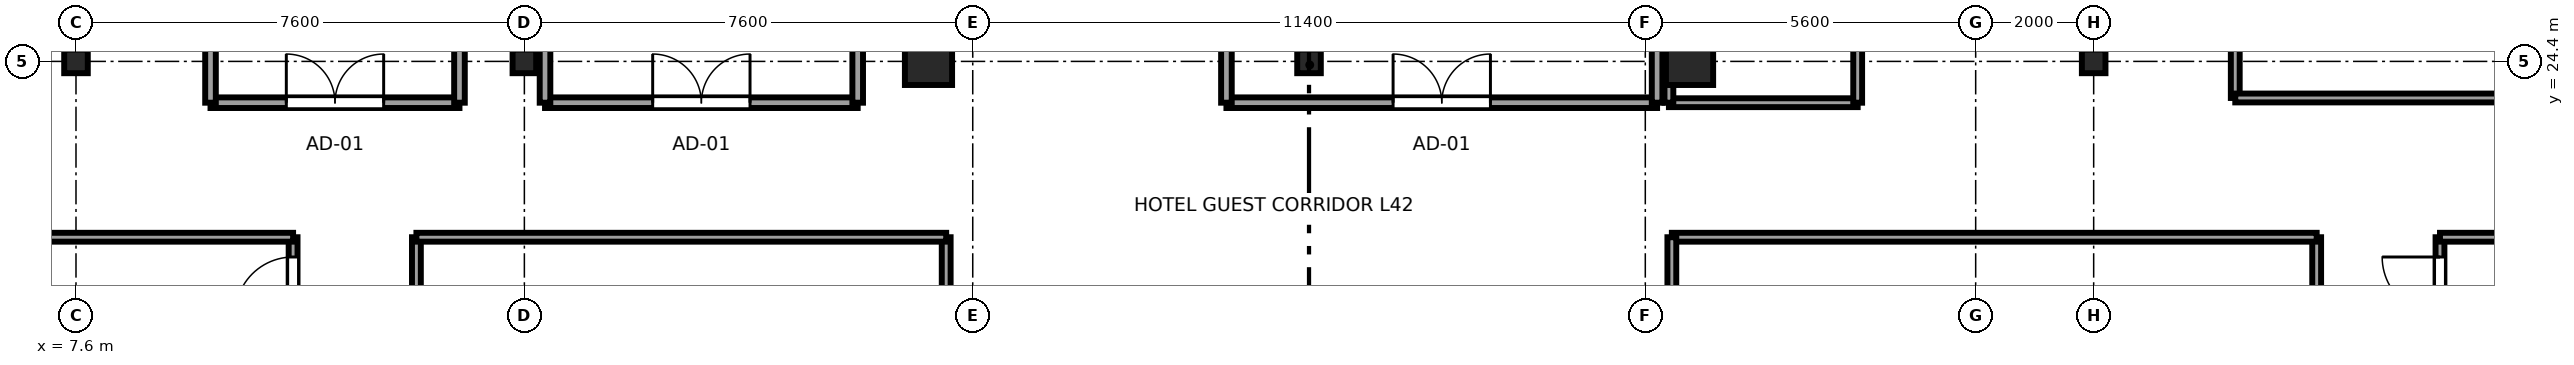
"""IFC4 building model, lengths in metres.
Left out: names, types, materials, properties, quantities, classifications, styles, units other than length and angle.
Written with IfcOpenShell. Run it as: python <this file> out.ifc"""

import sys

from ifc_helpers import new_model, si_unit, direction, frame, frame_2d, origin, origin_2d, place, context, subcontext, project, spatial, rectangle, i_section, extrude, source, transform, mapped, element, fill, save


model = new_model("IFC4")
c1 = context("Model", 3, precision=1e-05, world=origin(), true_north=direction((0.0, 1.0)))
c2 = subcontext(c1, "Body", "Model", "MODEL_VIEW")
j1 = project(units=[si_unit("LENGTHUNIT", "METRE"), si_unit("PLANEANGLEUNIT", "RADIAN")], contexts=[c1])
p1 = place(None, origin())
s1 = spatial("IfcSite", under=j1, at=p1, CompositionType="ELEMENT")
p2 = place(p1, origin())
s2 = spatial("IfcBuilding", under=s1, at=p2, CompositionType="ELEMENT")
p3 = place(p2, frame((0.0, 0.0, 161.25)))
s3 = spatial("IfcBuildingStorey", under=s2, at=p3, CompositionType="ELEMENT", Elevation=161.25)
m1 = source(origin(), c2, "Body", "SweptSolid", [
    extrude(i_section(OverallWidth=0.4, OverallDepth=0.4, WebThickness=0.02, FlangeThickness=0.035, at=origin_2d()), origin(), (0.0, 0.0, 1.0), 3.55),
])
for number, where, z_axis, x_axis in (
    (1, (7.6, 24.4, 0.0), (0.0, 0.0, 1.0), (1.0, 0.0, 0.0)),
    (2, (15.2, 24.4, 0.0), (0.0, 0.0, 1.0), (1.0, 0.0, 0.0)),
):
    element("IfcColumn", number, at=place(p3, frame(where, z_axis=z_axis, x_axis=x_axis)), inside=s3, PredefinedType="COLUMN", context=c2, shape_type="MappedRepresentation", body=[
        mapped(m1, transform((0.0, 0.0, 0.0), x_axis=(1.0, 0.0, 0.0), y_axis=(0.0, 1.0, 0.0), z_axis=(0.0, 0.0, 1.0), scale=1.0)),
    ])
m2 = source(origin(), c2, "Body", "SweptSolid", [
    extrude(rectangle(XDim=0.8, YDim=0.8, at=origin_2d()), origin(), (0.0, 0.0, 1.0), 3.55),
])
for number, where, z_axis, x_axis in (
    (3, (22.05, 24.4, 0.0), (0.0, 0.0, 1.0), (1.0, 0.0, 0.0)),
    (4, (34.95, 24.4, 0.0), (0.0, 0.0, 1.0), (1.0, 0.0, 0.0)),
):
    element("IfcColumn", number, at=place(p3, frame(where, z_axis=z_axis, x_axis=x_axis)), inside=s3, PredefinedType="COLUMN", context=c2, shape_type="MappedRepresentation", body=[
        mapped(m2, transform((0.0, 0.0, 0.0), x_axis=(1.0, 0.0, 0.0), y_axis=(0.0, 1.0, 0.0), z_axis=(0.0, 0.0, 1.0), scale=1.0)),
    ])
for number, where, z_axis, x_axis in (
    (5, (41.8, 24.4, 0.0), (0.0, 0.0, 1.0), (1.0, 0.0, 0.0)),
    (6, (28.5, 24.4, 0.0), (0.0, 0.0, 1.0), (1.0, 0.0, 0.0)),
):
    element("IfcColumn", number, at=place(p3, frame(where, z_axis=z_axis, x_axis=x_axis)), inside=s3, PredefinedType="COLUMN", context=c2, shape_type="MappedRepresentation", body=[
        mapped(m1, transform((0.0, 0.0, 0.0), x_axis=(1.0, 0.0, 0.0), y_axis=(0.0, 1.0, 0.0), z_axis=(0.0, 0.0, 1.0), scale=1.0)),
    ])
p4 = place(p3, frame((11.28, 19.81, 0.0), z_axis=(0.0, 0.0, 1.0), x_axis=(0.0, 1.0, 0.0)))
e7 = element("IfcWall", 7, at=p4, inside=s3, PredefinedType="PARTITIONING", context=c2, shape_type="SweptSolid", body=[
    extrude(rectangle(XDim=1.61, YDim=0.15, at=frame_2d((0.805, 0.0))), origin(), (0.0, 0.0, 1.0), 3.001),
])
p5 = place(p4, frame((0.295, 0.0, 0.0)))
e8 = element("IfcOpeningElement", 8, at=p5, cuts=e7, PredefinedType="OPENING", context=c2, shape_type="SweptSolid", body=[
    extrude(rectangle(XDim=0.98, YDim=2.12, at=frame_2d((0.49, 1.06))), frame((0.0, 0.085, 0.0), z_axis=(0.0, -1.0, 0.0), x_axis=(1.0, 0.0, 0.0)), (0.0, 0.0, 1.0), 0.17),
])
p6 = place(p3, frame((3.005, 21.42, 0.0), z_axis=(0.0, 0.0, 1.0), x_axis=(1.0, 0.0, 0.0)))
e9 = element("IfcWall", 9, at=p6, inside=s3, PredefinedType="PARTITIONING", context=c2, shape_type="SweptSolid", body=[
    extrude(rectangle(XDim=8.275, YDim=0.15, at=frame_2d((4.138, 0.0))), origin(), (0.0, 0.0, 1.0), 3.37),
])
p7 = place(p3, frame((13.37, 18.81, 0.0), z_axis=(0.0, 0.0, 1.0), x_axis=(0.0, 1.0, 0.0)))
e10 = element("IfcWall", 10, at=p7, inside=s3, PredefinedType="PARTITIONING", context=c2, shape_type="SweptSolid", body=[
    extrude(rectangle(XDim=2.61, YDim=0.15, at=frame_2d((1.305, 0.0))), origin(), (0.0, 0.0, 1.0), 3.37),
])
p8 = place(p7, frame((0.795, 0.0, 0.0)))
e11 = element("IfcOpeningElement", 11, at=p8, cuts=e10, PredefinedType="OPENING", context=c2, shape_type="SweptSolid", body=[
    extrude(rectangle(XDim=0.98, YDim=2.12, at=frame_2d((0.49, 1.06))), frame((0.0, 0.085, 0.0), z_axis=(0.0, -1.0, 0.0), x_axis=(1.0, 0.0, 0.0)), (0.0, 0.0, 1.0), 0.17),
])
p9 = place(p3, frame((22.35, 16.88, 0.0), z_axis=(0.0, 0.0, 1.0), x_axis=(0.0, 1.0, 0.0)))
e12 = element("IfcWall", 12, at=p9, inside=s3, PredefinedType="PARTITIONING", context=c2, shape_type="SweptSolid", body=[
    extrude(rectangle(XDim=4.54, YDim=0.15, at=frame_2d((2.27, 0.0))), origin(), (0.0, 0.0, 1.0), 3.37),
])
p10 = place(p3, frame((13.37, 21.42, 0.0), z_axis=(0.0, 0.0, 1.0), x_axis=(1.0, 0.0, 0.0)))
e13 = element("IfcWall", 13, at=p10, inside=s3, PredefinedType="PARTITIONING", context=c2, shape_type="SweptSolid", body=[
    extrude(rectangle(XDim=8.98, YDim=0.15, at=frame_2d((4.49, 0.0))), origin(), (0.0, 0.0, 1.0), 3.37),
])
p11 = place(p3, frame((45.58, 18.81, 0.0), z_axis=(0.0, 0.0, 1.0), x_axis=(0.0, 1.0, 0.0)))
e14 = element("IfcWall", 14, at=p11, inside=s3, PredefinedType="PARTITIONING", context=c2, shape_type="SweptSolid", body=[
    extrude(rectangle(XDim=2.61, YDim=0.15, at=frame_2d((1.305, 0.0))), origin(), (0.0, 0.0, 1.0), 3.001),
])
p12 = place(p11, frame((0.795, 0.0, 0.0)))
e15 = element("IfcOpeningElement", 15, at=p12, cuts=e14, PredefinedType="OPENING", context=c2, shape_type="SweptSolid", body=[
    extrude(rectangle(XDim=0.98, YDim=2.12, at=frame_2d((0.49, 1.06))), frame((0.0, 0.085, 0.0), z_axis=(0.0, -1.0, 0.0), x_axis=(1.0, 0.0, 0.0)), (0.0, 0.0, 1.0), 0.17),
])
p13 = place(p3, frame((34.65, 21.42, 0.0), z_axis=(0.0, 0.0, 1.0), x_axis=(1.0, 0.0, 0.0)))
e16 = element("IfcWall", 16, at=p13, inside=s3, PredefinedType="PARTITIONING", context=c2, shape_type="SweptSolid", body=[
    extrude(rectangle(XDim=10.93, YDim=0.15, at=frame_2d((5.465, 0.0))), origin(), (0.0, 0.0, 1.0), 3.37),
])
p14 = place(p3, frame((34.65, 16.88, 0.0), z_axis=(0.0, 0.0, 1.0), x_axis=(0.0, 1.0, 0.0)))
e17 = element("IfcWall", 17, at=p14, inside=s3, PredefinedType="PARTITIONING", context=c2, shape_type="SweptSolid", body=[
    extrude(rectangle(XDim=4.54, YDim=0.15, at=frame_2d((2.27, 0.0))), origin(), (0.0, 0.0, 1.0), 3.37),
])
p15 = place(p3, frame((47.67, 19.81, 0.0), z_axis=(0.0, 0.0, 1.0), x_axis=(0.0, 1.0, 0.0)))
e18 = element("IfcWall", 18, at=p15, inside=s3, PredefinedType="PARTITIONING", context=c2, shape_type="SweptSolid", body=[
    extrude(rectangle(XDim=1.61, YDim=0.15, at=frame_2d((0.805, 0.0))), origin(), (0.0, 0.0, 1.0), 3.37),
])
p16 = place(p15, frame((0.295, 0.0, 0.0)))
e19 = element("IfcOpeningElement", 19, at=p16, cuts=e18, PredefinedType="OPENING", context=c2, shape_type="SweptSolid", body=[
    extrude(rectangle(XDim=0.98, YDim=2.12, at=frame_2d((0.49, 1.06))), frame((0.0, 0.085, 0.0), z_axis=(0.0, -1.0, 0.0), x_axis=(1.0, 0.0, 0.0)), (0.0, 0.0, 1.0), 0.17),
])
p17 = place(p3, frame((47.67, 21.42, 0.0), z_axis=(0.0, 0.0, 1.0), x_axis=(1.0, 0.0, 0.0)))
e20 = element("IfcWall", 20, at=p17, inside=s3, PredefinedType="PARTITIONING", context=c2, shape_type="SweptSolid", body=[
    extrude(rectangle(XDim=6.325, YDim=0.15, at=frame_2d((3.163, 0.0))), origin(), (0.0, 0.0, 1.0), 3.37),
])
p18 = place(p3, frame((44.2, 23.78, 0.0), z_axis=(0.0, 0.0, 1.0), x_axis=(0.0, 1.0, 0.0)))
e21 = element("IfcWall", 21, at=p18, inside=s3, PredefinedType="PARTITIONING", context=c2, shape_type="SweptSolid", body=[
    extrude(rectangle(XDim=7.34, YDim=0.15, at=frame_2d((3.67, 0.0))), origin(), (0.0, 0.0, 1.0), 3.37),
])
p19 = place(p18, frame((3.18, 0.0, 0.0)))
e22 = element("IfcOpeningElement", 22, at=p19, cuts=e21, PredefinedType="OPENING", context=c2, shape_type="SweptSolid", body=[
    extrude(rectangle(XDim=0.98, YDim=2.12, at=frame_2d((0.49, 1.06))), frame((0.0, 0.085, 0.0), z_axis=(0.0, -1.0, 0.0), x_axis=(1.0, 0.0, 0.0)), (0.0, 0.0, 1.0), 0.17),
])
p20 = place(p3, frame((44.2, 23.78, 0.0), z_axis=(0.0, 0.0, 1.0), x_axis=(1.0, 0.0, 0.0)))
e23 = element("IfcWall", 23, at=p20, inside=s3, PredefinedType="PARTITIONING", context=c2, shape_type="SweptSolid", body=[
    extrude(rectangle(XDim=9.795, YDim=0.15, at=frame_2d((4.897, 0.0))), origin(), (0.0, 0.0, 1.0), 3.37),
])
p21 = place(p3, frame((9.88, 23.7, 0.0), z_axis=(0.0, 0.0, 1.0), x_axis=(1.0, 0.0, 0.0)))
e24 = element("IfcWall", 24, at=p21, inside=s3, PredefinedType="PARTITIONING", context=c2, shape_type="SweptSolid", body=[
    extrude(rectangle(XDim=4.22, YDim=0.18, at=frame_2d((2.11, 0.0))), origin(), (0.0, 0.0, 1.0), 3.37),
])
p22 = place(p21, frame((1.285, 0.0, 0.0)))
e25 = element("IfcOpeningElement", 25, at=p22, cuts=e24, PredefinedType="OPENING", context=c2, shape_type="SweptSolid", body=[
    extrude(rectangle(XDim=1.65, YDim=2.15, at=frame_2d((0.825, 1.075))), frame((0.0, 0.1, 0.0), z_axis=(0.0, -1.0, 0.0), x_axis=(1.0, 0.0, 0.0)), (0.0, 0.0, 1.0), 0.2),
])
for number, where, z_axis, x_axis in (
    (26, (9.88, 23.7, 0.0), (0.0, 0.0, 1.0), (0.0, 1.0, 0.0)),
    (27, (14.1, 23.7, 0.0), (0.0, 0.0, 1.0), (0.0, 1.0, 0.0)),
):
    element("IfcWall", number, at=place(p3, frame(where, z_axis=z_axis, x_axis=x_axis)), inside=s3, PredefinedType="PARTITIONING", context=c2, shape_type="SweptSolid", body=[
        extrude(rectangle(XDim=6.05, YDim=0.18, at=frame_2d((3.025, 0.0))), origin(), (0.0, 0.0, 1.0), 3.37),
    ])
p23 = place(p3, frame((27.1, 23.7, 0.0), z_axis=(0.0, 0.0, 1.0), x_axis=(1.0, 0.0, 0.0)))
e28 = element("IfcWall", 28, at=p23, inside=s3, PredefinedType="PARTITIONING", context=c2, shape_type="SweptSolid", body=[
    extrude(rectangle(XDim=7.3, YDim=0.18, at=frame_2d((3.65, 0.0))), origin(), (0.0, 0.0, 1.0), 3.37),
])
p24 = place(p23, frame((2.825, 0.0, 0.0)))
e29 = element("IfcOpeningElement", 29, at=p24, cuts=e28, PredefinedType="OPENING", context=c2, shape_type="SweptSolid", body=[
    extrude(rectangle(XDim=1.65, YDim=2.15, at=frame_2d((0.825, 1.075))), frame((0.0, 0.1, 0.0), z_axis=(0.0, -1.0, 0.0), x_axis=(1.0, 0.0, 0.0)), (0.0, 0.0, 1.0), 0.2),
])
for number, where, z_axis, x_axis in (
    (30, (27.1, 23.7, 0.0), (0.0, 0.0, 1.0), (0.0, 1.0, 0.0)),
    (31, (34.4, 23.7, 0.0), (0.0, 0.0, 1.0), (0.0, 1.0, 0.0)),
):
    element("IfcWall", number, at=place(p3, frame(where, z_axis=z_axis, x_axis=x_axis)), inside=s3, PredefinedType="PARTITIONING", context=c2, shape_type="SweptSolid", body=[
        extrude(rectangle(XDim=6.1, YDim=0.18, at=frame_2d((3.05, 0.0))), origin(), (0.0, 0.0, 1.0), 3.37),
    ])
p25 = place(p3, frame((15.55, 23.7, 0.0), z_axis=(0.0, 0.0, 1.0), x_axis=(1.0, 0.0, 0.0)))
e32 = element("IfcWall", 32, at=p25, inside=s3, PredefinedType="PARTITIONING", context=c2, shape_type="SweptSolid", body=[
    extrude(rectangle(XDim=5.3, YDim=0.18, at=frame_2d((2.65, 0.0))), origin(), (0.0, 0.0, 1.0), 3.37),
])
p26 = place(p25, frame((1.825, 0.0, 0.0)))
e33 = element("IfcOpeningElement", 33, at=p26, cuts=e32, PredefinedType="OPENING", context=c2, shape_type="SweptSolid", body=[
    extrude(rectangle(XDim=1.65, YDim=2.15, at=frame_2d((0.825, 1.075))), frame((0.0, 0.1, 0.0), z_axis=(0.0, -1.0, 0.0), x_axis=(1.0, 0.0, 0.0)), (0.0, 0.0, 1.0), 0.2),
])
for number, where, z_axis, x_axis in (
    (34, (15.55, 23.7, 0.0), (0.0, 0.0, 1.0), (0.0, 1.0, 0.0)),
    (35, (20.85, 23.7, 0.0), (0.0, 0.0, 1.0), (0.0, 1.0, 0.0)),
):
    element("IfcWall", number, at=place(p3, frame(where, z_axis=z_axis, x_axis=x_axis)), inside=s3, PredefinedType="PARTITIONING", context=c2, shape_type="SweptSolid", body=[
        extrude(rectangle(XDim=6.1, YDim=0.18, at=frame_2d((3.05, 0.0))), origin(), (0.0, 0.0, 1.0), 3.37),
    ])
p27 = place(p3, frame((34.6, 23.7, 0.0), z_axis=(0.0, 0.0, 1.0), x_axis=(1.0, 0.0, 0.0)))
e36 = element("IfcWall", 36, at=p27, inside=s3, PredefinedType="PARTITIONING", context=c2, shape_type="SweptSolid", body=[
    extrude(rectangle(XDim=3.2, YDim=0.15, at=frame_2d((1.6, 0.0))), origin(), (0.0, 0.0, 1.0), 3.37),
])
for number, where, z_axis, x_axis in (
    (37, (34.6, 23.7, 0.0), (0.0, 0.0, 1.0), (0.0, 1.0, 0.0)),
    (38, (37.8, 23.7, 0.0), (0.0, 0.0, 1.0), (0.0, 1.0, 0.0)),
):
    element("IfcWall", number, at=place(p3, frame(where, z_axis=z_axis, x_axis=x_axis)), inside=s3, PredefinedType="PARTITIONING", context=c2, shape_type="SweptSolid", body=[
        extrude(rectangle(XDim=5.7, YDim=0.15, at=frame_2d((2.85, 0.0))), origin(), (0.0, 0.0, 1.0), 3.37),
    ])
m3 = source(origin(), c2, "Body", "SweptSolid", [
    extrude(rectangle(XDim=0.98, YDim=2.12, at=frame_2d((0.49, 1.06))), frame((0.0, 0.025, 0.0), z_axis=(0.0, -1.0, 0.0), x_axis=(1.0, 0.0, 0.0)), (0.0, 0.0, 1.0), 0.05),
])
p28 = place(p5, origin())
e39 = element("IfcDoor", 39, at=p28, inside=s3, OperationType="SINGLE_SWING_LEFT", PredefinedType="DOOR", context=c2, shape_type="MappedRepresentation", body=[
    mapped(m3, transform((0.0, 0.0, 0.0), x_axis=(1.0, 0.0, 0.0), y_axis=(0.0, 1.0, 0.0), z_axis=(0.0, 0.0, 1.0), scale=1.0)),
])
fill(e8, e39)
p29 = place(p16, origin())
e40 = element("IfcDoor", 40, at=p29, inside=s3, OperationType="SINGLE_SWING_RIGHT", PredefinedType="DOOR", context=c2, shape_type="MappedRepresentation", body=[
    mapped(m3, transform((0.0, 0.0, 0.0), x_axis=(1.0, 0.0, 0.0), y_axis=(0.0, 1.0, 0.0), z_axis=(0.0, 0.0, 1.0), scale=1.0)),
])
fill(e19, e40)
m4 = source(origin(), c2, "Body", "SweptSolid", [
    extrude(rectangle(XDim=1.65, YDim=2.15, at=frame_2d((0.825, 1.075))), frame((0.0, 0.025, 0.0), z_axis=(0.0, -1.0, 0.0), x_axis=(1.0, 0.0, 0.0)), (0.0, 0.0, 1.0), 0.05),
])
p30 = place(p22, origin())
e41 = element("IfcDoor", 41, at=p30, inside=s3, OperationType="DOUBLE_DOOR_SINGLE_SWING", PredefinedType="DOOR", context=c2, shape_type="MappedRepresentation", body=[
    mapped(m4, transform((0.0, 0.0, 0.0), x_axis=(1.0, 0.0, 0.0), y_axis=(0.0, 1.0, 0.0), z_axis=(0.0, 0.0, 1.0), scale=1.0)),
])
fill(e25, e41)
p31 = place(p24, origin())
e42 = element("IfcDoor", 42, at=p31, inside=s3, OperationType="DOUBLE_DOOR_SINGLE_SWING", PredefinedType="DOOR", context=c2, shape_type="MappedRepresentation", body=[
    mapped(m4, transform((0.0, 0.0, 0.0), x_axis=(1.0, 0.0, 0.0), y_axis=(0.0, 1.0, 0.0), z_axis=(0.0, 0.0, 1.0), scale=1.0)),
])
fill(e29, e42)
p32 = place(p26, origin())
e43 = element("IfcDoor", 43, at=p32, inside=s3, OperationType="DOUBLE_DOOR_SINGLE_SWING", PredefinedType="DOOR", context=c2, shape_type="MappedRepresentation", body=[
    mapped(m4, transform((0.0, 0.0, 0.0), x_axis=(1.0, 0.0, 0.0), y_axis=(0.0, 1.0, 0.0), z_axis=(0.0, 0.0, 1.0), scale=1.0)),
])
fill(e33, e43)
save(model, sys.argv[1])
